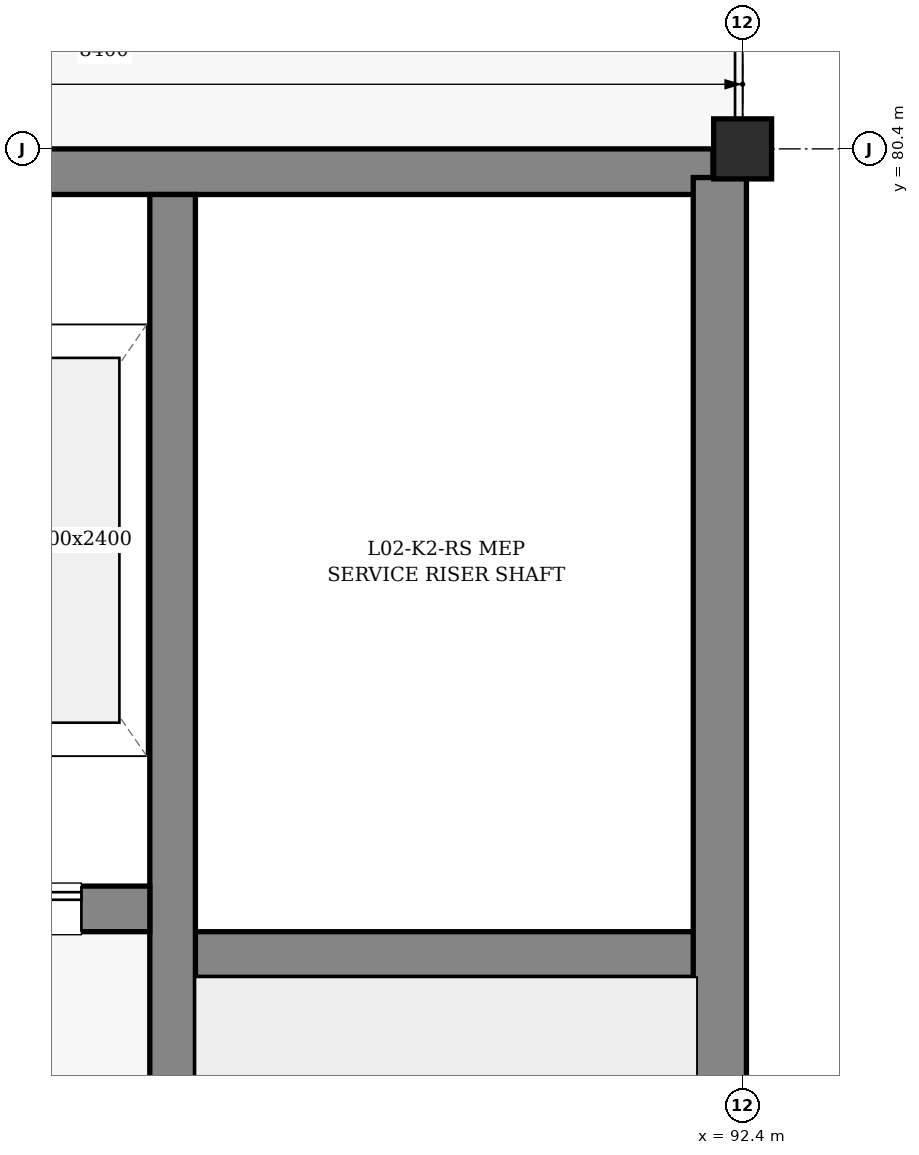
"""IFC4 building model, lengths in metres.
Left out: names, types, materials, properties, quantities, classifications, styles, units other than length and angle.
Written with IfcOpenShell. Run it as: python <this file> out.ifc"""

import sys

from ifc_helpers import new_model, si_unit, direction, frame, frame_2d, origin, origin_2d, place, context, subcontext, project, spatial, rectangle, i_section, extrude, element, fill, save


model = new_model("IFC4")
c1 = context("Model", 3, precision=1e-05, world=origin(), true_north=direction((0.0, 1.0)))
c2 = subcontext(c1, "Body", "Model", "MODEL_VIEW")
j1 = project(units=[si_unit("LENGTHUNIT", "METRE"), si_unit("PLANEANGLEUNIT", "RADIAN")], contexts=[c1])
p1 = place(None, origin())
s1 = spatial("IfcSite", under=j1, at=p1, CompositionType="ELEMENT")
p2 = place(p1, origin())
s2 = spatial("IfcBuilding", under=s1, at=p2, CompositionType="ELEMENT")
p3 = place(p2, frame((0.0, 0.0, 9.0)))
s3 = spatial("IfcBuildingStorey", under=s2, at=p3, CompositionType="ELEMENT", Elevation=9.0)
p4 = place(p3, frame((92.4, 80.4, 0.0), z_axis=(0.0, 0.0, 1.0), x_axis=(1.0, 0.0, 0.0)))
e1 = element("IfcColumn", 1, at=p4, inside=s3, PredefinedType="COLUMN", context=c2, shape_type="SweptSolid", body=[
    extrude(i_section(OverallWidth=0.395, OverallDepth=0.381, WebThickness=0.018, FlangeThickness=0.03, FilletRadius=0.015, at=origin_2d()), origin(), (0.0, 0.0, 1.0), 3.6),
])
p5 = place(p3, frame((84.196, 80.25, 0.0), z_axis=(0.0, 0.0, 1.0), x_axis=(1.0, 0.0, 0.0)))
e2 = element("IfcWall", 2, at=p5, inside=s3, PredefinedType="SHEAR", context=c2, shape_type="SweptSolid", body=[
    extrude(rectangle(XDim=8.009, YDim=0.3, at=frame_2d((4.004, 0.0))), origin(), (0.0, 0.0, 1.0), 3.38),
])
p6 = place(p3, frame((88.8, 75.1, 0.0), z_axis=(0.0, 0.0, 1.0), x_axis=(1.0, 0.0, 0.0)))
e3 = element("IfcWall", 3, at=p6, inside=s3, PredefinedType="SHEAR", context=c2, shape_type="SweptSolid", body=[
    extrude(rectangle(XDim=3.3, YDim=0.3, at=frame_2d((1.65, 0.0))), origin(), (0.0, 0.0, 1.0), 3.38),
])
p7 = place(p3, frame((92.25, 63.789, 0.0), z_axis=(0.0, 0.0, 1.0), x_axis=(0.0, 1.0, 0.0)))
e4 = element("IfcWall", 4, at=p7, inside=s3, PredefinedType="SHEAR", context=c2, shape_type="SweptSolid", body=[
    extrude(rectangle(XDim=16.423, YDim=0.35, at=frame_2d((8.211, 0.0))), origin(), (0.0, 0.0, 1.0), 3.38),
])
p8 = place(p3, frame((88.65, 63.9, 0.0), z_axis=(0.0, 0.0, 1.0), x_axis=(0.0, 1.0, 0.0)))
e5 = element("IfcWall", 5, at=p8, inside=s3, PredefinedType="SHEAR", context=c2, shape_type="SweptSolid", body=[
    extrude(rectangle(XDim=16.2, YDim=0.3, at=frame_2d((8.1, 0.0))), origin(), (0.0, 0.0, 1.0), 3.38),
])
p9 = place(p8, frame((0.5, 0.0, 0.0)))
e6 = element("IfcOpeningElement", 6, at=p9, cuts=e5, PredefinedType="OPENING", context=c2, shape_type="SweptSolid", body=[
    extrude(rectangle(XDim=1.15, YDim=2.15, at=frame_2d((0.575, 1.075))), frame((0.0, 0.16, 0.0), z_axis=(0.0, -1.0, 0.0), x_axis=(1.0, 0.0, 0.0)), (0.0, 0.0, 1.0), 0.32),
])
p10 = place(p3, frame((84.3, 75.4, 0.0), z_axis=(0.0, 0.0, 1.0), x_axis=(1.0, 0.0, 0.0)))
e7 = element("IfcWall", 7, at=p10, inside=s3, PredefinedType="SHEAR", context=c2, shape_type="SweptSolid", body=[
    extrude(rectangle(XDim=4.2, YDim=0.3, at=frame_2d((2.1, 0.0))), origin(), (0.0, 0.0, 1.0), 3.38),
])
p11 = place(p10, frame((0.45, 0.0, 0.0)))
e8 = element("IfcOpeningElement", 8, at=p11, cuts=e7, PredefinedType="OPENING", context=c2, shape_type="SweptSolid", body=[
    extrude(rectangle(XDim=1.1, YDim=2.2, at=frame_2d((0.55, 1.1))), frame((0.0, 0.16, 0.0), z_axis=(0.0, -1.0, 0.0), x_axis=(1.0, 0.0, 0.0)), (0.0, 0.0, 1.0), 0.32),
])
p12 = place(p10, frame((2.65, 0.0, 0.0)))
e9 = element("IfcOpeningElement", 9, at=p12, cuts=e7, PredefinedType="OPENING", context=c2, shape_type="SweptSolid", body=[
    extrude(rectangle(XDim=1.1, YDim=2.2, at=frame_2d((0.55, 1.1))), frame((0.0, 0.16, 0.0), z_axis=(0.0, -1.0, 0.0), x_axis=(1.0, 0.0, 0.0)), (0.0, 0.0, 1.0), 0.32),
])
p13 = place(p12, origin())
e10 = element("IfcDoor", 10, at=p13, inside=s3, OperationType="SLIDING_TO_LEFT", PredefinedType="DOOR", context=c2, shape_type="SweptSolid", body=[
    extrude(rectangle(XDim=1.1, YDim=2.2, at=frame_2d((0.55, 1.1))), frame((0.0, 0.025, 0.0), z_axis=(0.0, -1.0, 0.0), x_axis=(1.0, 0.0, 0.0)), (0.0, 0.0, 1.0), 0.05),
])
fill(e9, e10)
save(model, sys.argv[1])
